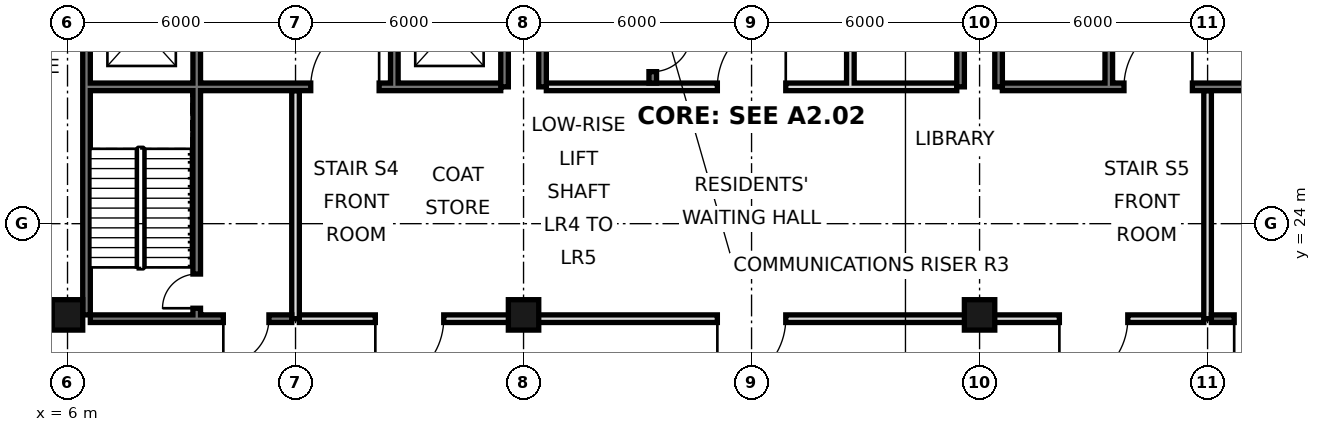
"""IFC4 building model, lengths in metres.
Left out: names, types, materials, properties, quantities, classifications, styles, units other than length and angle.
Written with IfcOpenShell. Run it as: python <this file> out.ifc"""

import sys

from ifc_helpers import new_model, si_unit, direction, frame, frame_2d, origin, origin_2d, place, context, subcontext, project, spatial, rectangle, hollow_rectangle, extrude, element, fill, save


model = new_model("IFC4")
c1 = context("Model", 3, precision=1e-05, world=origin(), true_north=direction((0.0, 1.0)))
c2 = subcontext(c1, "Body", "Model", "MODEL_VIEW")
j1 = project(units=[si_unit("LENGTHUNIT", "METRE"), si_unit("PLANEANGLEUNIT", "RADIAN")], contexts=[c1])
p1 = place(None, origin())
s1 = spatial("IfcSite", under=j1, at=p1, CompositionType="ELEMENT")
p2 = place(p1, origin())
s2 = spatial("IfcBuilding", under=s1, at=p2, CompositionType="ELEMENT")
p3 = place(p2, frame((0.0, 0.0, -9.0)))
s3 = spatial("IfcBuildingStorey", under=s2, at=p3, CompositionType="ELEMENT", Elevation=-9.0)
for number, where, z_axis, x_axis in (
    (1, (6.0, 21.6, 0.0), (0.0, 0.0, 1.0), (1.0, 0.0, 0.0)),
    (2, (18.0, 21.6, 0.0), (0.0, 0.0, 1.0), (1.0, 0.0, 0.0)),
    (3, (30.0, 21.6, 0.0), (0.0, 0.0, 1.0), (1.0, 0.0, 0.0)),
):
    element("IfcColumn", number, at=place(p3, frame(where, z_axis=z_axis, x_axis=x_axis)), inside=s3, PredefinedType="COLUMN", context=c2, shape_type="SweptSolid", body=[
        extrude(hollow_rectangle(XDim=0.8, YDim=0.8, WallThickness=0.07, at=origin_2d()), origin(), (0.0, 0.0, 1.0), 4.5),
    ])
p4 = place(p3, frame((6.5, 21.6, 0.0), z_axis=(0.0, 0.0, 1.0), x_axis=(0.0, 1.0, 0.0)))
e4 = element("IfcWall", 4, at=p4, inside=s3, PredefinedType="SOLIDWALL", context=c2, shape_type="SweptSolid", body=[
    extrude(rectangle(XDim=23.5, YDim=0.2, at=frame_2d((11.75, 0.0))), origin(), (0.0, 0.0, 1.0), 4.14),
])
for number, where, z_axis, x_axis in (
    (5, (17.5, 27.6, 0.0), (0.0, 0.0, 1.0), (0.0, 1.0, 0.0)),
    (6, (18.5, 27.6, 0.0), (0.0, 0.0, 1.0), (0.0, 1.0, 0.0)),
    (7, (29.5, 27.6, 0.0), (0.0, 0.0, 1.0), (0.0, 1.0, 0.0)),
    (8, (30.5, 27.6, 0.0), (0.0, 0.0, 1.0), (0.0, 1.0, 0.0)),
):
    element("IfcWall", number, at=place(p3, frame(where, z_axis=z_axis, x_axis=x_axis)), inside=s3, PredefinedType="SOLIDWALL", context=c2, shape_type="SweptSolid", body=[
        extrude(rectangle(XDim=17.5, YDim=0.2, at=frame_2d((8.75, 0.0))), origin(), (0.0, 0.0, 1.0), 4.14),
    ])
p5 = place(p3, frame((12.1, 21.5, 0.0), z_axis=(0.0, 0.0, 1.0), x_axis=(1.0, 0.0, 0.0)))
e9 = element("IfcWall", 9, at=p5, inside=s3, PredefinedType="SOLIDWALL", context=c2, shape_type="SweptSolid", body=[
    extrude(rectangle(XDim=23.8, YDim=0.2, at=frame_2d((11.9, 0.0))), origin(), (0.0, 0.0, 1.0), 3.04),
])
p6 = place(p5, frame((2.0, 0.0, 0.0)))
e10 = element("IfcOpeningElement", 10, at=p6, cuts=e9, PredefinedType="OPENING", context=c2, shape_type="SweptSolid", body=[
    extrude(rectangle(XDim=1.8, YDim=2.1, at=frame_2d((0.9, 1.05))), frame((0.0, 0.11, 0.0), z_axis=(0.0, -1.0, 0.0), x_axis=(1.0, 0.0, 0.0)), (0.0, 0.0, 1.0), 0.22),
])
p7 = place(p5, frame((11.0, 0.0, 0.0)))
e11 = element("IfcOpeningElement", 11, at=p7, cuts=e9, PredefinedType="OPENING", context=c2, shape_type="SweptSolid", body=[
    extrude(rectangle(XDim=1.8, YDim=2.1, at=frame_2d((0.9, 1.05))), frame((0.0, 0.11, 0.0), z_axis=(0.0, -1.0, 0.0), x_axis=(1.0, 0.0, 0.0)), (0.0, 0.0, 1.0), 0.22),
])
p8 = place(p5, frame((20.0, 0.0, 0.0)))
e12 = element("IfcOpeningElement", 12, at=p8, cuts=e9, PredefinedType="OPENING", context=c2, shape_type="SweptSolid", body=[
    extrude(rectangle(XDim=1.8, YDim=2.1, at=frame_2d((0.9, 1.05))), frame((0.0, 0.11, 0.0), z_axis=(0.0, -1.0, 0.0), x_axis=(1.0, 0.0, 0.0)), (0.0, 0.0, 1.0), 0.22),
])
p9 = place(p3, frame((12.0, 21.5, 0.0), z_axis=(0.0, 0.0, 1.0), x_axis=(0.0, 1.0, 0.0)))
e13 = element("IfcWall", 13, at=p9, inside=s3, PredefinedType="PARTITIONING", context=c2, shape_type="SweptSolid", body=[
    extrude(rectangle(XDim=6.0, YDim=0.2, at=frame_2d((3.0, 0.0))), origin(), (0.0, 0.0, 1.0), 3.04),
])
p10 = place(p3, frame((14.6, 27.7, 0.0), z_axis=(0.0, 0.0, 1.0), x_axis=(0.0, 1.0, 0.0)))
e14 = element("IfcWall", 14, at=p10, inside=s3, PredefinedType="SOLIDWALL", context=c2, shape_type="SweptSolid", body=[
    extrude(rectangle(XDim=17.3, YDim=0.2, at=frame_2d((8.65, 0.0))), origin(), (0.0, 0.0, 1.0), 4.14),
])
p11 = place(p10, frame((0.9, 0.0, 0.0)))
e15 = element("IfcOpeningElement", 15, at=p11, cuts=e14, PredefinedType="OPENING", context=c2, shape_type="SweptSolid", body=[
    extrude(rectangle(XDim=1.1, YDim=2.1, at=frame_2d((0.55, 1.05))), frame((0.0, 0.11, 0.0), z_axis=(0.0, -1.0, 0.0), x_axis=(1.0, 0.0, 0.0)), (0.0, 0.0, 1.0), 0.22),
])
p12 = place(p10, frame((4.0, 0.0, 0.0)))
e16 = element("IfcOpeningElement", 16, at=p12, cuts=e14, PredefinedType="OPENING", context=c2, shape_type="SweptSolid", body=[
    extrude(rectangle(XDim=1.1, YDim=2.1, at=frame_2d((0.55, 1.05))), frame((0.0, 0.11, 0.0), z_axis=(0.0, -1.0, 0.0), x_axis=(1.0, 0.0, 0.0)), (0.0, 0.0, 1.0), 0.22),
])
p13 = place(p10, frame((15.2, 0.0, 0.0)))
e17 = element("IfcOpeningElement", 17, at=p13, cuts=e14, PredefinedType="OPENING", context=c2, shape_type="SweptSolid", body=[
    extrude(rectangle(XDim=1.1, YDim=2.1, at=frame_2d((0.55, 1.05))), frame((0.0, 0.11, 0.0), z_axis=(0.0, -1.0, 0.0), x_axis=(1.0, 0.0, 0.0)), (0.0, 0.0, 1.0), 0.22),
])
p14 = place(p10, frame((9.7, 0.0, 0.0)))
e18 = element("IfcOpeningElement", 18, at=p14, cuts=e14, PredefinedType="OPENING", context=c2, shape_type="SweptSolid", body=[
    extrude(rectangle(XDim=0.9, YDim=2.1, at=frame_2d((0.45, 1.05))), frame((0.0, 0.11, 0.0), z_axis=(0.0, -1.0, 0.0), x_axis=(1.0, 0.0, 0.0)), (0.0, 0.0, 1.0), 0.22),
])
p15 = place(p3, frame((21.4, 27.7, 0.0), z_axis=(0.0, 0.0, 1.0), x_axis=(0.0, 1.0, 0.0)))
e19 = element("IfcWall", 19, at=p15, inside=s3, PredefinedType="SOLIDWALL", context=c2, shape_type="SweptSolid", body=[
    extrude(rectangle(XDim=17.3, YDim=0.2, at=frame_2d((8.65, 0.0))), origin(), (0.0, 0.0, 1.0), 4.14),
])
p16 = place(p15, frame((0.3, 0.0, 0.0)))
e20 = element("IfcOpeningElement", 20, at=p16, cuts=e19, PredefinedType="OPENING", context=c2, shape_type="SweptSolid", body=[
    extrude(rectangle(XDim=1.0, YDim=2.1, at=frame_2d((0.5, 1.05))), frame((0.0, 0.11, 0.0), z_axis=(0.0, -1.0, 0.0), x_axis=(1.0, 0.0, 0.0)), (0.0, 0.0, 1.0), 0.22),
])
p17 = place(p15, frame((3.4, 0.0, 0.0)))
e21 = element("IfcOpeningElement", 21, at=p17, cuts=e19, PredefinedType="OPENING", context=c2, shape_type="SweptSolid", body=[
    extrude(rectangle(XDim=1.0, YDim=2.1, at=frame_2d((0.5, 1.05))), frame((0.0, 0.11, 0.0), z_axis=(0.0, -1.0, 0.0), x_axis=(1.0, 0.0, 0.0)), (0.0, 0.0, 1.0), 0.22),
])
p18 = place(p15, frame((16.0, 0.0, 0.0)))
e22 = element("IfcOpeningElement", 22, at=p18, cuts=e19, PredefinedType="OPENING", context=c2, shape_type="SweptSolid", body=[
    extrude(rectangle(XDim=1.0, YDim=2.1, at=frame_2d((0.5, 1.05))), frame((0.0, 0.11, 0.0), z_axis=(0.0, -1.0, 0.0), x_axis=(1.0, 0.0, 0.0)), (0.0, 0.0, 1.0), 0.22),
])
p19 = place(p15, frame((7.2, 0.0, 0.0)))
e23 = element("IfcOpeningElement", 23, at=p19, cuts=e19, PredefinedType="OPENING", context=c2, shape_type="SweptSolid", body=[
    extrude(rectangle(XDim=0.9, YDim=2.1, at=frame_2d((0.45, 1.05))), frame((0.0, 0.11, 0.0), z_axis=(0.0, -1.0, 0.0), x_axis=(1.0, 0.0, 0.0)), (0.0, 0.0, 1.0), 0.22),
])
p20 = place(p3, frame((26.6, 27.7, 0.0), z_axis=(0.0, 0.0, 1.0), x_axis=(0.0, 1.0, 0.0)))
e24 = element("IfcWall", 24, at=p20, inside=s3, PredefinedType="SOLIDWALL", context=c2, shape_type="SweptSolid", body=[
    extrude(rectangle(XDim=17.3, YDim=0.2, at=frame_2d((8.65, 0.0))), origin(), (0.0, 0.0, 1.0), 4.14),
])
p21 = place(p20, frame((4.1, 0.0, 0.0)))
e25 = element("IfcOpeningElement", 25, at=p21, cuts=e24, PredefinedType="OPENING", context=c2, shape_type="SweptSolid", body=[
    extrude(rectangle(XDim=0.9, YDim=2.1, at=frame_2d((0.45, 1.05))), frame((0.0, 0.11, 0.0), z_axis=(0.0, -1.0, 0.0), x_axis=(1.0, 0.0, 0.0)), (0.0, 0.0, 1.0), 0.22),
])
p22 = place(p20, frame((10.15, 0.0, 0.0)))
e26 = element("IfcOpeningElement", 26, at=p22, cuts=e24, PredefinedType="OPENING", context=c2, shape_type="SweptSolid", body=[
    extrude(rectangle(XDim=1.0, YDim=2.1, at=frame_2d((0.5, 1.05))), frame((0.0, 0.11, 0.0), z_axis=(0.0, -1.0, 0.0), x_axis=(1.0, 0.0, 0.0)), (0.0, 0.0, 1.0), 0.22),
])
p23 = place(p20, frame((14.375, 0.0, 0.0)))
e27 = element("IfcOpeningElement", 27, at=p23, cuts=e24, PredefinedType="OPENING", context=c2, shape_type="SweptSolid", body=[
    extrude(rectangle(XDim=1.0, YDim=2.1, at=frame_2d((0.5, 1.05))), frame((0.0, 0.11, 0.0), z_axis=(0.0, -1.0, 0.0), x_axis=(1.0, 0.0, 0.0)), (0.0, 0.0, 1.0), 0.22),
])
p24 = place(p3, frame((33.4, 27.7, 0.0), z_axis=(0.0, 0.0, 1.0), x_axis=(0.0, 1.0, 0.0)))
e28 = element("IfcWall", 28, at=p24, inside=s3, PredefinedType="SOLIDWALL", context=c2, shape_type="SweptSolid", body=[
    extrude(rectangle(XDim=17.3, YDim=0.2, at=frame_2d((8.65, 0.0))), origin(), (0.0, 0.0, 1.0), 3.04),
])
p25 = place(p24, frame((15.2, 0.0, 0.0)))
e29 = element("IfcOpeningElement", 29, at=p25, cuts=e28, PredefinedType="OPENING", context=c2, shape_type="SweptSolid", body=[
    extrude(rectangle(XDim=1.1, YDim=2.1, at=frame_2d((0.55, 1.05))), frame((0.0, 0.11, 0.0), z_axis=(0.0, -1.0, 0.0), x_axis=(1.0, 0.0, 0.0)), (0.0, 0.0, 1.0), 0.22),
])
p26 = place(p24, frame((2.5, 0.0, 0.0)))
e30 = element("IfcOpeningElement", 30, at=p26, cuts=e28, PredefinedType="OPENING", context=c2, shape_type="SweptSolid", body=[
    extrude(rectangle(XDim=1.0, YDim=2.1, at=frame_2d((0.5, 1.05))), frame((0.0, 0.11, 0.0), z_axis=(0.0, -1.0, 0.0), x_axis=(1.0, 0.0, 0.0)), (0.0, 0.0, 1.0), 0.22),
])
p27 = place(p24, frame((9.7, 0.0, 0.0)))
e31 = element("IfcOpeningElement", 31, at=p27, cuts=e28, PredefinedType="OPENING", context=c2, shape_type="SweptSolid", body=[
    extrude(rectangle(XDim=0.9, YDim=2.1, at=frame_2d((0.45, 1.05))), frame((0.0, 0.11, 0.0), z_axis=(0.0, -1.0, 0.0), x_axis=(1.0, 0.0, 0.0)), (0.0, 0.0, 1.0), 0.22),
])
p28 = place(p3, frame((36.0, 21.5, 0.0), z_axis=(0.0, 0.0, 1.0), x_axis=(0.0, 1.0, 0.0)))
e32 = element("IfcWall", 32, at=p28, inside=s3, PredefinedType="PARTITIONING", context=c2, shape_type="SweptSolid", body=[
    extrude(rectangle(XDim=6.0, YDim=0.2, at=frame_2d((3.0, 0.0))), origin(), (0.0, 0.0, 1.0), 3.04),
])
p29 = place(p3, frame((9.4, 21.5, 0.0), z_axis=(0.0, 0.0, 1.0), x_axis=(0.0, 1.0, 0.0)))
e33 = element("IfcWall", 33, at=p29, inside=s3, PredefinedType="SOLIDWALL", context=c2, shape_type="SweptSolid", body=[
    extrude(rectangle(XDim=23.5, YDim=0.2, at=frame_2d((11.75, 0.0))), origin(), (0.0, 0.0, 1.0), 3.04),
])
p30 = place(p29, frame((7.1, 0.0, 0.0)))
e34 = element("IfcOpeningElement", 34, at=p30, cuts=e33, PredefinedType="OPENING", context=c2, shape_type="SweptSolid", body=[
    extrude(rectangle(XDim=1.1, YDim=2.1, at=frame_2d((0.55, 1.05))), frame((0.0, 0.11, 0.0), z_axis=(0.0, -1.0, 0.0), x_axis=(1.0, 0.0, 0.0)), (0.0, 0.0, 1.0), 0.22),
])
p31 = place(p29, frame((10.2, 0.0, 0.0)))
e35 = element("IfcOpeningElement", 35, at=p31, cuts=e33, PredefinedType="OPENING", context=c2, shape_type="SweptSolid", body=[
    extrude(rectangle(XDim=1.1, YDim=2.1, at=frame_2d((0.55, 1.05))), frame((0.0, 0.11, 0.0), z_axis=(0.0, -1.0, 0.0), x_axis=(1.0, 0.0, 0.0)), (0.0, 0.0, 1.0), 0.22),
])
p32 = place(p29, frame((13.3, 0.0, 0.0)))
e36 = element("IfcOpeningElement", 36, at=p32, cuts=e33, PredefinedType="OPENING", context=c2, shape_type="SweptSolid", body=[
    extrude(rectangle(XDim=1.1, YDim=2.1, at=frame_2d((0.55, 1.05))), frame((0.0, 0.11, 0.0), z_axis=(0.0, -1.0, 0.0), x_axis=(1.0, 0.0, 0.0)), (0.0, 0.0, 1.0), 0.22),
])
p33 = place(p29, frame((22.2, 0.0, 0.0)))
e37 = element("IfcOpeningElement", 37, at=p33, cuts=e33, PredefinedType="OPENING", context=c2, shape_type="SweptSolid", body=[
    extrude(rectangle(XDim=1.0, YDim=2.1, at=frame_2d((0.5, 1.05))), frame((0.0, 0.11, 0.0), z_axis=(0.0, -1.0, 0.0), x_axis=(1.0, 0.0, 0.0)), (0.0, 0.0, 1.0), 0.22),
])
p34 = place(p29, frame((0.275, 0.0, 0.0)))
e38 = element("IfcOpeningElement", 38, at=p34, cuts=e33, PredefinedType="OPENING", context=c2, shape_type="SweptSolid", body=[
    extrude(rectangle(XDim=0.9, YDim=2.1, at=frame_2d((0.45, 1.05))), frame((0.0, 0.11, 0.0), z_axis=(0.0, -1.0, 0.0), x_axis=(1.0, 0.0, 0.0)), (0.0, 0.0, 1.0), 0.22),
])
p35 = place(p3, frame((36.1, 21.5, 0.0), z_axis=(0.0, 0.0, 1.0), x_axis=(1.0, 0.0, 0.0)))
e39 = element("IfcWall", 39, at=p35, inside=s3, PredefinedType="SOLIDWALL", context=c2, shape_type="SweptSolid", body=[
    extrude(rectangle(XDim=5.3, YDim=0.2, at=frame_2d((2.65, 0.0))), origin(), (0.0, 0.0, 1.0), 3.04),
])
p36 = place(p35, frame((0.6, 0.0, 0.0)))
e40 = element("IfcOpeningElement", 40, at=p36, cuts=e39, PredefinedType="OPENING", context=c2, shape_type="SweptSolid", body=[
    extrude(rectangle(XDim=1.2, YDim=2.1, at=frame_2d((0.6, 1.05))), frame((0.0, 0.11, 0.0), z_axis=(0.0, -1.0, 0.0), x_axis=(1.0, 0.0, 0.0)), (0.0, 0.0, 1.0), 0.22),
])
p37 = place(p3, frame((6.6, 21.5, 0.0), z_axis=(0.0, 0.0, 1.0), x_axis=(1.0, 0.0, 0.0)))
e41 = element("IfcWall", 41, at=p37, inside=s3, PredefinedType="SOLIDWALL", context=c2, shape_type="SweptSolid", body=[
    extrude(rectangle(XDim=5.3, YDim=0.2, at=frame_2d((2.65, 0.0))), origin(), (0.0, 0.0, 1.0), 3.04),
])
p38 = place(p37, frame((3.5, 0.0, 0.0)))
e42 = element("IfcOpeningElement", 42, at=p38, cuts=e41, PredefinedType="OPENING", context=c2, shape_type="SweptSolid", body=[
    extrude(rectangle(XDim=1.2, YDim=2.1, at=frame_2d((0.6, 1.05))), frame((0.0, 0.11, 0.0), z_axis=(0.0, -1.0, 0.0), x_axis=(1.0, 0.0, 0.0)), (0.0, 0.0, 1.0), 0.22),
])
p39 = place(p3, frame((18.6, 27.6, 0.0), z_axis=(0.0, 0.0, 1.0), x_axis=(1.0, 0.0, 0.0)))
e43 = element("IfcWall", 43, at=p39, inside=s3, PredefinedType="SOLIDWALL", context=c2, shape_type="SweptSolid", body=[
    extrude(rectangle(XDim=10.8, YDim=0.2, at=frame_2d((5.4, 0.0))), origin(), (0.0, 0.0, 1.0), 4.14),
])
p40 = place(p39, frame((4.5, 0.0, 0.0)))
e44 = element("IfcOpeningElement", 44, at=p40, cuts=e43, PredefinedType="OPENING", context=c2, shape_type="SweptSolid", body=[
    extrude(rectangle(XDim=1.8, YDim=2.1, at=frame_2d((0.9, 1.05))), frame((0.0, 0.11, 0.0), z_axis=(0.0, -1.0, 0.0), x_axis=(1.0, 0.0, 0.0)), (0.0, 0.0, 1.0), 0.22),
])
p41 = place(p3, frame((30.6, 27.6, 0.0), z_axis=(0.0, 0.0, 1.0), x_axis=(1.0, 0.0, 0.0)))
e45 = element("IfcWall", 45, at=p41, inside=s3, PredefinedType="SOLIDWALL", context=c2, shape_type="SweptSolid", body=[
    extrude(rectangle(XDim=10.8, YDim=0.2, at=frame_2d((5.4, 0.0))), origin(), (0.0, 0.0, 1.0), 4.14),
])
p42 = place(p41, frame((3.2, 0.0, 0.0)))
e46 = element("IfcOpeningElement", 46, at=p42, cuts=e45, PredefinedType="OPENING", context=c2, shape_type="SweptSolid", body=[
    extrude(rectangle(XDim=1.8, YDim=2.1, at=frame_2d((0.9, 1.05))), frame((0.0, 0.11, 0.0), z_axis=(0.0, -1.0, 0.0), x_axis=(1.0, 0.0, 0.0)), (0.0, 0.0, 1.0), 0.22),
])
p43 = place(p3, frame((6.6, 27.6, 0.0), z_axis=(0.0, 0.0, 1.0), x_axis=(1.0, 0.0, 0.0)))
e47 = element("IfcWall", 47, at=p43, inside=s3, PredefinedType="SOLIDWALL", context=c2, shape_type="SweptSolid", body=[
    extrude(rectangle(XDim=10.8, YDim=0.2, at=frame_2d((5.4, 0.0))), origin(), (0.0, 0.0, 1.0), 4.14),
])
p44 = place(p43, frame((5.8, 0.0, 0.0)))
e48 = element("IfcOpeningElement", 48, at=p44, cuts=e47, PredefinedType="OPENING", context=c2, shape_type="SweptSolid", body=[
    extrude(rectangle(XDim=1.8, YDim=2.1, at=frame_2d((0.9, 1.05))), frame((0.0, 0.11, 0.0), z_axis=(0.0, -1.0, 0.0), x_axis=(1.0, 0.0, 0.0)), (0.0, 0.0, 1.0), 0.22),
])
p45 = place(p6, frame((1.8, 0.0, 0.0), z_axis=(0.0, 0.0, 1.0), x_axis=(-1.0, 0.0, 0.0)))
e49 = element("IfcDoor", 49, at=p45, inside=s3, OperationType="SINGLE_SWING_RIGHT", PredefinedType="DOOR", context=c2, shape_type="SweptSolid", body=[
    extrude(rectangle(XDim=1.8, YDim=2.1, at=frame_2d((0.9, 1.05))), frame((0.0, 0.025, 0.0), z_axis=(0.0, -1.0, 0.0), x_axis=(1.0, 0.0, 0.0)), (0.0, 0.0, 1.0), 0.05),
])
fill(e10, e49)
p46 = place(p7, frame((1.8, 0.0, 0.0), z_axis=(0.0, 0.0, 1.0), x_axis=(-1.0, 0.0, 0.0)))
e50 = element("IfcDoor", 50, at=p46, inside=s3, OperationType="SINGLE_SWING_RIGHT", PredefinedType="DOOR", context=c2, shape_type="SweptSolid", body=[
    extrude(rectangle(XDim=1.8, YDim=2.1, at=frame_2d((0.9, 1.05))), frame((0.0, 0.025, 0.0), z_axis=(0.0, -1.0, 0.0), x_axis=(1.0, 0.0, 0.0)), (0.0, 0.0, 1.0), 0.05),
])
fill(e11, e50)
p47 = place(p8, frame((1.8, 0.0, 0.0), z_axis=(0.0, 0.0, 1.0), x_axis=(-1.0, 0.0, 0.0)))
e51 = element("IfcDoor", 51, at=p47, inside=s3, OperationType="SINGLE_SWING_RIGHT", PredefinedType="DOOR", context=c2, shape_type="SweptSolid", body=[
    extrude(rectangle(XDim=1.8, YDim=2.1, at=frame_2d((0.9, 1.05))), frame((0.0, 0.025, 0.0), z_axis=(0.0, -1.0, 0.0), x_axis=(1.0, 0.0, 0.0)), (0.0, 0.0, 1.0), 0.05),
])
fill(e12, e51)
p48 = place(p38, frame((1.2, 0.0, 0.0), z_axis=(0.0, 0.0, 1.0), x_axis=(-1.0, 0.0, 0.0)))
e52 = element("IfcDoor", 52, at=p48, inside=s3, OperationType="SINGLE_SWING_RIGHT", PredefinedType="DOOR", context=c2, shape_type="SweptSolid", body=[
    extrude(rectangle(XDim=1.2, YDim=2.1, at=frame_2d((0.6, 1.05))), frame((0.0, 0.025, 0.0), z_axis=(0.0, -1.0, 0.0), x_axis=(1.0, 0.0, 0.0)), (0.0, 0.0, 1.0), 0.05),
])
fill(e42, e52)
p49 = place(p36, frame((1.2, 0.0, 0.0), z_axis=(0.0, 0.0, 1.0), x_axis=(-1.0, 0.0, 0.0)))
e53 = element("IfcDoor", 53, at=p49, inside=s3, OperationType="SINGLE_SWING_RIGHT", PredefinedType="DOOR", context=c2, shape_type="SweptSolid", body=[
    extrude(rectangle(XDim=1.2, YDim=2.1, at=frame_2d((0.6, 1.05))), frame((0.0, 0.025, 0.0), z_axis=(0.0, -1.0, 0.0), x_axis=(1.0, 0.0, 0.0)), (0.0, 0.0, 1.0), 0.05),
])
fill(e40, e53)
p50 = place(p44, frame((1.8, 0.0, 0.0), z_axis=(0.0, 0.0, 1.0), x_axis=(-1.0, 0.0, 0.0)))
e54 = element("IfcDoor", 54, at=p50, inside=s3, OperationType="SINGLE_SWING_LEFT", PredefinedType="DOOR", context=c2, shape_type="SweptSolid", body=[
    extrude(rectangle(XDim=1.8, YDim=2.1, at=frame_2d((0.9, 1.05))), frame((0.0, 0.025, 0.0), z_axis=(0.0, -1.0, 0.0), x_axis=(1.0, 0.0, 0.0)), (0.0, 0.0, 1.0), 0.05),
])
fill(e48, e54)
p51 = place(p40, frame((1.8, 0.0, 0.0), z_axis=(0.0, 0.0, 1.0), x_axis=(-1.0, 0.0, 0.0)))
e55 = element("IfcDoor", 55, at=p51, inside=s3, OperationType="SINGLE_SWING_LEFT", PredefinedType="DOOR", context=c2, shape_type="SweptSolid", body=[
    extrude(rectangle(XDim=1.8, YDim=2.1, at=frame_2d((0.9, 1.05))), frame((0.0, 0.025, 0.0), z_axis=(0.0, -1.0, 0.0), x_axis=(1.0, 0.0, 0.0)), (0.0, 0.0, 1.0), 0.05),
])
fill(e44, e55)
p52 = place(p42, frame((1.8, 0.0, 0.0), z_axis=(0.0, 0.0, 1.0), x_axis=(-1.0, 0.0, 0.0)))
e56 = element("IfcDoor", 56, at=p52, inside=s3, OperationType="SINGLE_SWING_LEFT", PredefinedType="DOOR", context=c2, shape_type="SweptSolid", body=[
    extrude(rectangle(XDim=1.8, YDim=2.1, at=frame_2d((0.9, 1.05))), frame((0.0, 0.025, 0.0), z_axis=(0.0, -1.0, 0.0), x_axis=(1.0, 0.0, 0.0)), (0.0, 0.0, 1.0), 0.05),
])
fill(e46, e56)
p53 = place(p16, origin())
e57 = element("IfcDoor", 57, at=p53, inside=s3, OperationType="SINGLE_SWING_RIGHT", PredefinedType="DOOR", context=c2, shape_type="SweptSolid", body=[
    extrude(rectangle(XDim=1.0, YDim=2.1, at=frame_2d((0.5, 1.05))), frame((0.0, 0.025, 0.0), z_axis=(0.0, -1.0, 0.0), x_axis=(1.0, 0.0, 0.0)), (0.0, 0.0, 1.0), 0.05),
])
fill(e20, e57)
p54 = place(p34, origin())
e58 = element("IfcDoor", 58, at=p54, inside=s3, OperationType="SINGLE_SWING_LEFT", PredefinedType="DOOR", context=c2, shape_type="SweptSolid", body=[
    extrude(rectangle(XDim=0.9, YDim=2.1, at=frame_2d((0.45, 1.05))), frame((0.0, 0.025, 0.0), z_axis=(0.0, -1.0, 0.0), x_axis=(1.0, 0.0, 0.0)), (0.0, 0.0, 1.0), 0.05),
])
fill(e38, e58)
save(model, sys.argv[1])
